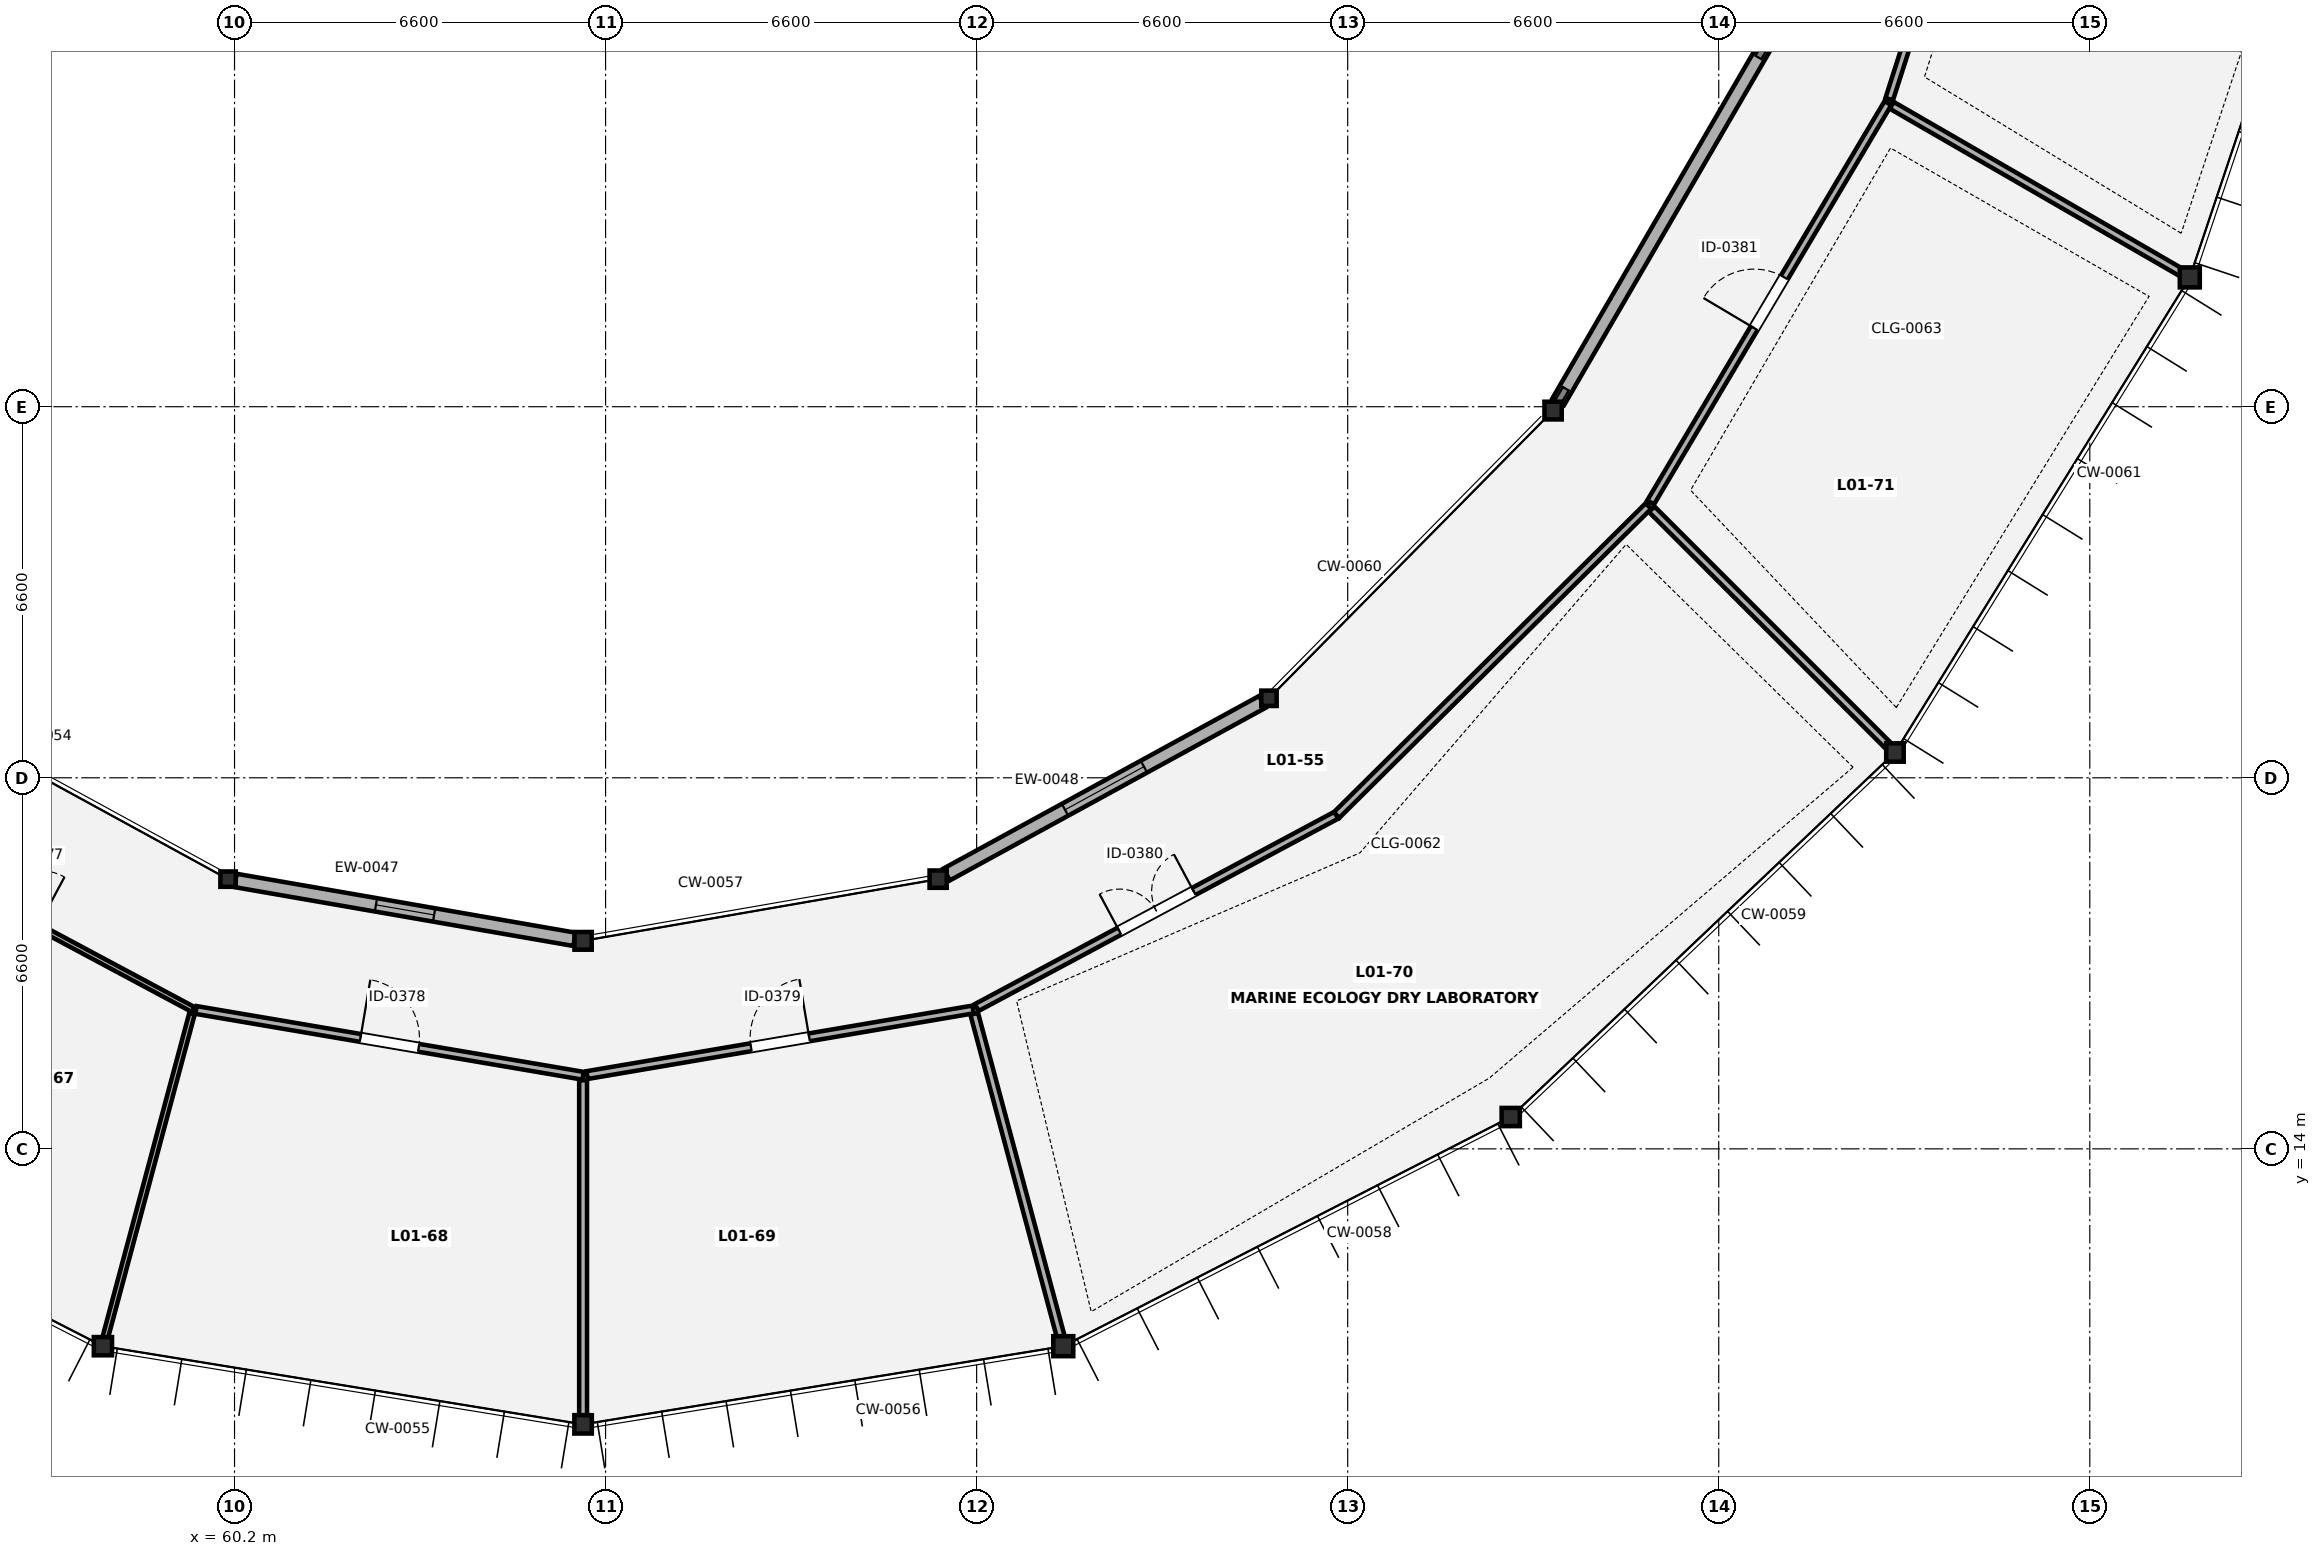
"""IFC4 building model, lengths in metres.
Left out: names, types, materials, properties, quantities, classifications, styles, units other than length and angle.
Written with IfcOpenShell. Run it as: python <this file> out.ifc"""

import sys

from ifc_helpers import new_model, si_unit, direction, frame, frame_2d, origin, origin_2d, place, context, subcontext, project, spatial, rectangle, hollow_circle, i_section, extrude, element, fill, save


model = new_model("IFC4")
c1 = context("Model", 3, precision=1e-05, world=origin(), true_north=direction((0.0, 1.0)))
c2 = subcontext(c1, "Body", "Model", "MODEL_VIEW")
j1 = project(units=[si_unit("LENGTHUNIT", "METRE"), si_unit("PLANEANGLEUNIT", "RADIAN")], contexts=[c1])
p1 = place(None, origin())
s1 = spatial("IfcSite", under=j1, at=p1, CompositionType="ELEMENT")
p2 = place(p1, origin())
s2 = spatial("IfcBuilding", under=s1, at=p2, CompositionType="ELEMENT")
p3 = place(p2, frame((0.0, 0.0, 4.9)))
s3 = spatial("IfcBuildingStorey", under=s2, at=p3, CompositionType="ELEMENT", Elevation=4.9)
p4 = place(p3, frame((57.859, 10.49, 0.0), z_axis=(0.0, 0.0, 1.0), x_axis=(1.0, 0.0, 0.0)))
e1 = element("IfcColumn", 1, at=p4, inside=s3, PredefinedType="COLUMN", context=c2, shape_type="SweptSolid", body=[
    extrude(hollow_circle(Radius=0.162, WallThickness=0.013, at=origin_2d()), origin(), (0.0, 0.0, 1.0), 4.2),
])
p5 = place(p3, frame((60.085, 18.797, 0.0), z_axis=(0.0, 0.0, 1.0), x_axis=(1.0, 0.0, 0.0)))
e2 = element("IfcColumn", 2, at=p5, inside=s3, PredefinedType="COLUMN", context=c2, shape_type="SweptSolid", body=[
    extrude(hollow_circle(Radius=0.136, WallThickness=0.009, at=origin_2d()), origin(), (0.0, 0.0, 1.0), 4.2),
])
p6 = place(p3, frame((66.4, 9.1, 0.0), z_axis=(0.0, 0.0, 1.0), x_axis=(1.0, 0.0, 0.0)))
e3 = element("IfcColumn", 3, at=p6, inside=s3, PredefinedType="COLUMN", context=c2, shape_type="SweptSolid", body=[
    extrude(i_section(OverallWidth=0.311, OverallDepth=0.327, WebThickness=0.016, FlangeThickness=0.025, FilletRadius=0.017, at=origin_2d()), origin(), (0.0, 0.0, 1.0), 4.2),
])
p7 = place(p3, frame((66.4, 17.7, 0.0), z_axis=(0.0, 0.0, 1.0), x_axis=(1.0, 0.0, 0.0)))
e4 = element("IfcColumn", 4, at=p7, inside=s3, PredefinedType="COLUMN", context=c2, shape_type="SweptSolid", body=[
    extrude(i_section(OverallWidth=0.307, OverallDepth=0.315, WebThickness=0.012, FlangeThickness=0.019, FilletRadius=0.017, at=origin_2d()), origin(), (0.0, 0.0, 1.0), 4.2),
])
p8 = place(p3, frame((74.941, 10.49, 0.0), z_axis=(0.0, 0.0, 1.0), x_axis=(1.0, 0.0, 0.0)))
e5 = element("IfcColumn", 5, at=p8, inside=s3, PredefinedType="COLUMN", context=c2, shape_type="SweptSolid", body=[
    extrude(hollow_circle(Radius=0.178, WallThickness=0.013, at=origin_2d()), origin(), (0.0, 0.0, 1.0), 4.2),
])
p9 = place(p3, frame((72.715, 18.797, 0.0), z_axis=(0.0, 0.0, 1.0), x_axis=(1.0, 0.0, 0.0)))
e6 = element("IfcColumn", 6, at=p9, inside=s3, PredefinedType="COLUMN", context=c2, shape_type="SweptSolid", body=[
    extrude(i_section(OverallWidth=0.305, OverallDepth=0.308, WebThickness=0.01, FlangeThickness=0.015, FilletRadius=0.017, at=origin_2d()), origin(), (0.0, 0.0, 1.0), 4.2),
])
p10 = place(p3, frame((82.9, 14.566, 0.0), z_axis=(0.0, 0.0, 1.0), x_axis=(1.0, 0.0, 0.0)))
e7 = element("IfcColumn", 7, at=p10, inside=s3, PredefinedType="COLUMN", context=c2, shape_type="SweptSolid", body=[
    extrude(hollow_circle(Radius=0.162, WallThickness=0.013, at=origin_2d()), origin(), (0.0, 0.0, 1.0), 4.2),
])
p11 = place(p3, frame((78.6, 22.014, 0.0), z_axis=(0.0, 0.0, 1.0), x_axis=(1.0, 0.0, 0.0)))
e8 = element("IfcColumn", 8, at=p11, inside=s3, PredefinedType="COLUMN", context=c2, shape_type="SweptSolid", body=[
    extrude(hollow_circle(Radius=0.136, WallThickness=0.009, at=origin_2d()), origin(), (0.0, 0.0, 1.0), 4.2),
])
p12 = place(p3, frame((89.735, 21.05, 0.0), z_axis=(0.0, 0.0, 1.0), x_axis=(1.0, 0.0, 0.0)))
e9 = element("IfcColumn", 9, at=p12, inside=s3, PredefinedType="COLUMN", context=c2, shape_type="SweptSolid", body=[
    extrude(i_section(OverallWidth=0.311, OverallDepth=0.327, WebThickness=0.016, FlangeThickness=0.025, FilletRadius=0.017, at=origin_2d()), origin(), (0.0, 0.0, 1.0), 4.2),
])
p13 = place(p3, frame((83.653, 27.131, 0.0), z_axis=(0.0, 0.0, 1.0), x_axis=(1.0, 0.0, 0.0)))
e10 = element("IfcColumn", 10, at=p13, inside=s3, PredefinedType="COLUMN", context=c2, shape_type="SweptSolid", body=[
    extrude(i_section(OverallWidth=0.307, OverallDepth=0.315, WebThickness=0.012, FlangeThickness=0.019, FilletRadius=0.017, at=origin_2d()), origin(), (0.0, 0.0, 1.0), 4.2),
])
p14 = place(p3, frame((94.979, 29.5, 0.0), z_axis=(0.0, 0.0, 1.0), x_axis=(1.0, 0.0, 0.0)))
e11 = element("IfcColumn", 11, at=p14, inside=s3, PredefinedType="COLUMN", context=c2, shape_type="SweptSolid", body=[
    extrude(hollow_circle(Radius=0.178, WallThickness=0.013, at=origin_2d()), origin(), (0.0, 0.0, 1.0), 4.2),
])
p15 = place(p3, frame((60.217, 18.774, 0.0), z_axis=(0.0, 0.0, 1.0), x_axis=(0.985241011519, -0.171172863562, 0.0)))
e12 = element("IfcWall", 12, at=p15, inside=s3, PredefinedType="SOLIDWALL", context=c2, shape_type="SweptSolid", body=[
    extrude(rectangle(XDim=6.122, YDim=0.24, at=frame_2d((3.061, 0.0))), origin(), (0.0, 0.0, 1.0), 3.65),
])
p16 = place(p15, frame((2.536, 0.0, 0.85)))
e13 = element("IfcOpeningElement", 13, at=p16, cuts=e12, PredefinedType="OPENING", context=c2, shape_type="SweptSolid", body=[
    extrude(rectangle(XDim=1.05, YDim=1.35, at=frame_2d((0.525, 0.675))), frame((0.0, 0.13, 0.0), z_axis=(0.0, -1.0, 0.0), x_axis=(1.0, 0.0, 0.0)), (0.0, 0.0, 1.0), 0.26),
])
p17 = place(p3, frame((72.866, 18.88, 0.0), z_axis=(0.0, 0.0, 1.0), x_axis=(0.877463709328, 0.479643032695, 0.0)))
e14 = element("IfcWall", 14, at=p17, inside=s3, PredefinedType="SOLIDWALL", context=c2, shape_type="SweptSolid", body=[
    extrude(rectangle(XDim=6.4, YDim=0.24, at=frame_2d((3.2, 0.0))), origin(), (0.0, 0.0, 1.0), 3.65),
])
p18 = place(p17, frame((2.4, 0.0, 0.85)))
e15 = element("IfcOpeningElement", 15, at=p18, cuts=e14, PredefinedType="OPENING", context=c2, shape_type="SweptSolid", body=[
    extrude(rectangle(XDim=1.6, YDim=1.5, at=frame_2d((0.8, 0.75))), frame((0.0, 0.13, 0.0), z_axis=(0.0, -1.0, 0.0), x_axis=(1.0, 0.0, 0.0)), (0.0, 0.0, 1.0), 0.26),
])
p19 = place(p3, frame((83.744, 27.287, 0.0), z_axis=(0.0, 0.0, 1.0), x_axis=(0.50266774775, 0.864479690549, 0.0)))
e16 = element("IfcWall", 16, at=p19, inside=s3, PredefinedType="SOLIDWALL", context=c2, shape_type="SweptSolid", body=[
    extrude(rectangle(XDim=7.358, YDim=0.24, at=frame_2d((3.679, 0.0))), origin(), (0.0, 0.0, 1.0), 3.65),
])
p20 = place(p3, frame((53.063, 19.902, 0.0), z_axis=(0.0, 0.0, 1.0), x_axis=(0.881826283139, -0.471574391125, 0.0)))
e17 = element("IfcWall", 17, at=p20, inside=s3, PredefinedType="PARTITIONING", context=c2, shape_type="SweptSolid", body=[
    extrude(rectangle(XDim=7.258, YDim=0.1, at=frame_2d((3.629, 0.0))), origin(), (0.0, 0.0, 1.0), 3.98),
])
p21 = place(p20, frame((3.129, 0.0, 0.0)))
e18 = element("IfcOpeningElement", 18, at=p21, cuts=e17, PredefinedType="OPENING", context=c2, shape_type="SweptSolid", body=[
    extrude(rectangle(XDim=1.0, YDim=2.1, at=frame_2d((0.5, 1.05))), frame((0.0, 0.06, 0.0), z_axis=(0.0, -1.0, 0.0), x_axis=(1.0, 0.0, 0.0)), (0.0, 0.0, 1.0), 0.12),
])
p22 = place(p3, frame((59.443, 16.402, 0.0), z_axis=(0.0, 0.0, 1.0), x_axis=(-0.258805895167, -0.965929349708, 0.0)))
e19 = element("IfcWall", 19, at=p22, inside=s3, PredefinedType="PARTITIONING", context=c2, shape_type="SweptSolid", body=[
    extrude(rectangle(XDim=6.06, YDim=0.1, at=frame_2d((3.03, 0.0))), origin(), (0.0, 0.0, 1.0), 3.323),
])
p23 = place(p3, frame((59.515, 16.47, 0.0), z_axis=(0.0, 0.0, 1.0), x_axis=(0.985861622289, -0.167561516157, 0.0)))
e20 = element("IfcWall", 20, at=p23, inside=s3, PredefinedType="PARTITIONING", context=c2, shape_type="SweptSolid", body=[
    extrude(rectangle(XDim=6.983, YDim=0.14, at=frame_2d((3.492, 0.0))), origin(), (0.0, 0.0, 1.0), 3.98),
])
p24 = place(p23, frame((2.967, 0.0, 0.0)))
e21 = element("IfcOpeningElement", 21, at=p24, cuts=e20, PredefinedType="OPENING", context=c2, shape_type="SweptSolid", body=[
    extrude(rectangle(XDim=1.05, YDim=2.15, at=frame_2d((0.525, 1.075))), frame((0.0, 0.08, 0.0), z_axis=(0.0, -1.0, 0.0), x_axis=(1.0, 0.0, 0.0)), (0.0, 0.0, 1.0), 0.16),
])
p25 = place(p3, frame((66.4, 15.22, 0.0), z_axis=(0.0, 0.0, 1.0), x_axis=(0.0, -1.0, 0.0)))
e22 = element("IfcWall", 22, at=p25, inside=s3, PredefinedType="PARTITIONING", context=c2, shape_type="SweptSolid", body=[
    extrude(rectangle(XDim=6.06, YDim=0.14, at=frame_2d((3.03, 0.0))), origin(), (0.0, 0.0, 1.0), 3.392),
])
p26 = place(p3, frame((66.472, 15.312, 0.0), z_axis=(0.0, 0.0, 1.0), x_axis=(0.985861002198, 0.167565164474, 0.0)))
e23 = element("IfcWall", 23, at=p26, inside=s3, PredefinedType="PARTITIONING", context=c2, shape_type="SweptSolid", body=[
    extrude(rectangle(XDim=6.963, YDim=0.14, at=frame_2d((3.481, 0.0))), origin(), (0.0, 0.0, 1.0), 3.98),
])
p27 = place(p26, frame((2.956, 0.0, 0.0)))
e24 = element("IfcOpeningElement", 24, at=p27, cuts=e23, PredefinedType="OPENING", context=c2, shape_type="SweptSolid", body=[
    extrude(rectangle(XDim=1.05, YDim=2.15, at=frame_2d((0.525, 1.075))), frame((0.0, 0.08, 0.0), z_axis=(0.0, -1.0, 0.0), x_axis=(1.0, 0.0, 0.0)), (0.0, 0.0, 1.0), 0.16),
])
p28 = place(p3, frame((73.357, 16.402, 0.0), z_axis=(0.0, 0.0, 1.0), x_axis=(0.258805895167, -0.965929349708, 0.0)))
e25 = element("IfcWall", 25, at=p28, inside=s3, PredefinedType="PARTITIONING", context=c2, shape_type="SweptSolid", body=[
    extrude(rectangle(XDim=6.06, YDim=0.14, at=frame_2d((3.03, 0.0))), origin(), (0.0, 0.0, 1.0), 3.392),
])
p29 = place(p3, frame((73.402, 16.514, 0.0), z_axis=(0.0, 0.0, 1.0), x_axis=(0.881829873621, 0.471567676999, 0.0)))
e26 = element("IfcWall", 26, at=p29, inside=s3, PredefinedType="PARTITIONING", context=c2, shape_type="SweptSolid", body=[
    extrude(rectangle(XDim=7.256, YDim=0.14, at=frame_2d((3.628, 0.0))), origin(), (0.0, 0.0, 1.0), 3.98),
])
p30 = place(p29, frame((2.878, 0.0, 0.0)))
e27 = element("IfcOpeningElement", 27, at=p30, cuts=e26, PredefinedType="OPENING", context=c2, shape_type="SweptSolid", body=[
    extrude(rectangle(XDim=1.5, YDim=2.15, at=frame_2d((0.75, 1.075))), frame((0.0, 0.08, 0.0), z_axis=(0.0, -1.0, 0.0), x_axis=(1.0, 0.0, 0.0)), (0.0, 0.0, 1.0), 0.16),
])
p31 = place(p3, frame((79.802, 19.937, 0.0), z_axis=(0.0, 0.0, 1.0), x_axis=(0.710427757183, 0.703770134222, 0.0)))
e28 = element("IfcWall", 28, at=p31, inside=s3, PredefinedType="PARTITIONING", context=c2, shape_type="SweptSolid", body=[
    extrude(rectangle(XDim=7.811, YDim=0.14, at=frame_2d((3.905, 0.0))), origin(), (0.0, 0.0, 1.0), 3.98),
])
p32 = place(p3, frame((85.407, 25.377, 0.0), z_axis=(0.0, 0.0, 1.0), x_axis=(0.707106781187, -0.707106781187, 0.0)))
e29 = element("IfcWall", 29, at=p32, inside=s3, PredefinedType="PARTITIONING", context=c2, shape_type="SweptSolid", body=[
    extrude(rectangle(XDim=6.06, YDim=0.14, at=frame_2d((3.03, 0.0))), origin(), (0.0, 0.0, 1.0), 3.323),
])
p33 = place(p3, frame((85.388, 25.498, 0.0), z_axis=(0.0, 0.0, 1.0), x_axis=(0.510914893672, 0.8596312997, 0.0)))
e30 = element("IfcWall", 30, at=p33, inside=s3, PredefinedType="PARTITIONING", context=c2, shape_type="SweptSolid", body=[
    extrude(rectangle(XDim=8.262, YDim=0.14, at=frame_2d((4.131, 0.0))), origin(), (0.0, 0.0, 1.0), 3.98),
])
p34 = place(p33, frame((3.606, 0.0, 0.0)))
e31 = element("IfcOpeningElement", 31, at=p34, cuts=e30, PredefinedType="OPENING", context=c2, shape_type="SweptSolid", body=[
    extrude(rectangle(XDim=1.05, YDim=2.15, at=frame_2d((0.525, 1.075))), frame((0.0, 0.08, 0.0), z_axis=(0.0, -1.0, 0.0), x_axis=(1.0, 0.0, 0.0)), (0.0, 0.0, 1.0), 0.16),
])
p35 = place(p3, frame((89.679, 32.56, 0.0), z_axis=(0.0, 0.0, 1.0), x_axis=(0.866020543329, -0.500008418462, 0.0)))
e32 = element("IfcWall", 32, at=p35, inside=s3, PredefinedType="PARTITIONING", context=c2, shape_type="SweptSolid", body=[
    extrude(rectangle(XDim=6.06, YDim=0.14, at=frame_2d((3.03, 0.0))), origin(), (0.0, 0.0, 1.0), 3.392),
])
p36 = place(p3, frame((89.632, 32.67, 0.0), z_axis=(0.0, 0.0, 1.0), x_axis=(0.305495322231, 0.952193577008, 0.0)))
e33 = element("IfcWall", 33, at=p36, inside=s3, PredefinedType="PARTITIONING", context=c2, shape_type="SweptSolid", body=[
    extrude(rectangle(XDim=8.69, YDim=0.14, at=frame_2d((4.345, 0.0))), origin(), (0.0, 0.0, 1.0), 3.98),
])
p37 = place(p36, frame((3.82, 0.0, 0.0)))
e34 = element("IfcOpeningElement", 34, at=p37, cuts=e33, PredefinedType="OPENING", context=c2, shape_type="SweptSolid", body=[
    extrude(rectangle(XDim=1.05, YDim=2.15, at=frame_2d((0.525, 1.075))), frame((0.0, 0.08, 0.0), z_axis=(0.0, -1.0, 0.0), x_axis=(1.0, 0.0, 0.0)), (0.0, 0.0, 1.0), 0.16),
])
p38 = place(p16, origin())
e35 = element("IfcWindow", 35, at=p38, inside=s3, PartitioningType="SINGLE_PANEL", PredefinedType="WINDOW", context=c2, shape_type="SweptSolid", body=[
    extrude(rectangle(XDim=1.05, YDim=1.35, at=frame_2d((0.525, 0.675))), frame((0.0, 0.03, 0.0), z_axis=(0.0, -1.0, 0.0), x_axis=(1.0, 0.0, 0.0)), (0.0, 0.0, 1.0), 0.06),
])
fill(e13, e35)
p39 = place(p18, origin())
e36 = element("IfcWindow", 36, at=p39, inside=s3, PartitioningType="SINGLE_PANEL", PredefinedType="WINDOW", context=c2, shape_type="SweptSolid", body=[
    extrude(rectangle(XDim=1.6, YDim=1.5, at=frame_2d((0.8, 0.75))), frame((0.0, 0.03, 0.0), z_axis=(0.0, -1.0, 0.0), x_axis=(1.0, 0.0, 0.0)), (0.0, 0.0, 1.0), 0.06),
])
fill(e15, e36)
p40 = place(p24, origin())
e37 = element("IfcDoor", 37, at=p40, inside=s3, OperationType="SINGLE_SWING_LEFT", PredefinedType="DOOR", context=c2, shape_type="SweptSolid", body=[
    extrude(rectangle(XDim=1.05, YDim=2.15, at=frame_2d((0.525, 1.075))), frame((0.0, 0.025, 0.0), z_axis=(0.0, -1.0, 0.0), x_axis=(1.0, 0.0, 0.0)), (0.0, 0.0, 1.0), 0.05),
])
fill(e21, e37)
p41 = place(p27, origin())
e38 = element("IfcDoor", 38, at=p41, inside=s3, OperationType="SINGLE_SWING_RIGHT", PredefinedType="DOOR", context=c2, shape_type="SweptSolid", body=[
    extrude(rectangle(XDim=1.05, YDim=2.15, at=frame_2d((0.525, 1.075))), frame((0.0, 0.025, 0.0), z_axis=(0.0, -1.0, 0.0), x_axis=(1.0, 0.0, 0.0)), (0.0, 0.0, 1.0), 0.05),
])
fill(e24, e38)
p42 = place(p30, origin())
e39 = element("IfcDoor", 39, at=p42, inside=s3, OperationType="DOUBLE_DOOR_SINGLE_SWING", PredefinedType="DOOR", context=c2, shape_type="SweptSolid", body=[
    extrude(rectangle(XDim=1.5, YDim=2.15, at=frame_2d((0.75, 1.075))), frame((0.0, 0.025, 0.0), z_axis=(0.0, -1.0, 0.0), x_axis=(1.0, 0.0, 0.0)), (0.0, 0.0, 1.0), 0.05),
])
fill(e27, e39)
p43 = place(p34, origin())
e40 = element("IfcDoor", 40, at=p43, inside=s3, OperationType="SINGLE_SWING_LEFT", PredefinedType="DOOR", context=c2, shape_type="SweptSolid", body=[
    extrude(rectangle(XDim=1.05, YDim=2.15, at=frame_2d((0.525, 1.075))), frame((0.0, 0.025, 0.0), z_axis=(0.0, -1.0, 0.0), x_axis=(1.0, 0.0, 0.0)), (0.0, 0.0, 1.0), 0.05),
])
fill(e31, e40)
save(model, sys.argv[1])
